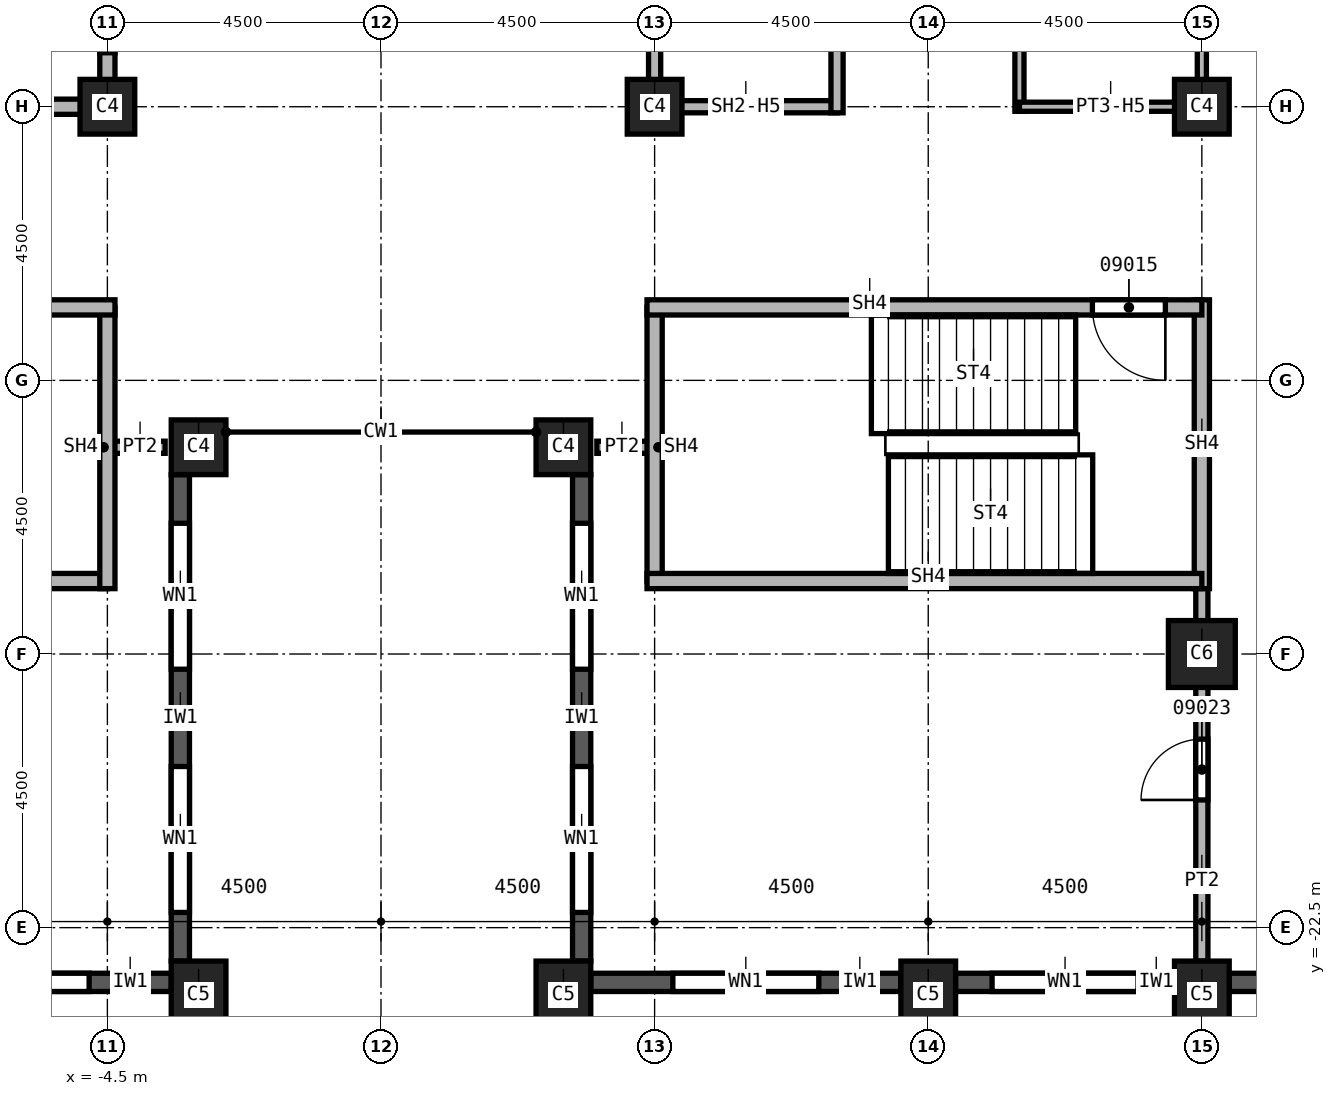
"""IFC4 building model, lengths in metres.
Left out: names, types, materials, properties, quantities, classifications, styles, units other than length and angle.
Written with IfcOpenShell. Run it as: python <this file> out.ifc"""

import sys

from ifc_helpers import new_model, si_unit, direction, frame, frame_2d, origin, origin_2d, place, context, subcontext, project, spatial, rectangle, extrude, element, fill, save


model = new_model("IFC4")
c1 = context("Model", 3, precision=1e-05, world=origin(), true_north=direction((0.0, 1.0)))
c2 = subcontext(c1, "Body", "Model", "MODEL_VIEW")
j1 = project(units=[si_unit("LENGTHUNIT", "METRE"), si_unit("PLANEANGLEUNIT", "RADIAN")], contexts=[c1])
p1 = place(None, origin())
s1 = spatial("IfcSite", under=j1, at=p1, CompositionType="ELEMENT")
p2 = place(p1, origin())
s2 = spatial("IfcBuilding", under=s1, at=p2, CompositionType="ELEMENT")
p3 = place(p2, frame((0.0, 0.0, 162.0)))
s3 = spatial("IfcBuildingStorey", under=s2, at=p3, CompositionType="ELEMENT", Elevation=162.0)
p4 = place(p3, frame((13.5, -18.0, 0.0), z_axis=(0.0, 0.0, 1.0), x_axis=(1.0, 0.0, 0.0)))
e1 = element("IfcColumn", 1, at=p4, inside=s3, PredefinedType="COLUMN", context=c2, shape_type="SweptSolid", body=[
    extrude(rectangle(XDim=1.1, YDim=1.1, at=origin_2d()), origin(), (0.0, 0.0, 1.0), 3.7),
])
for number, where, z_axis, x_axis in (
    (2, (4.5, -9.0, 0.0), (0.0, 0.0, 1.0), (1.0, 0.0, 0.0)),
    (3, (13.5, -9.0, 0.0), (0.0, 0.0, 1.0), (1.0, 0.0, 0.0)),
    (4, (-4.5, -9.0, 0.0), (0.0, 0.0, 1.0), (1.0, 0.0, 0.0)),
):
    element("IfcColumn", number, at=place(p3, frame(where, z_axis=z_axis, x_axis=x_axis)), inside=s3, PredefinedType="COLUMN", context=c2, shape_type="SweptSolid", body=[
        extrude(rectangle(XDim=0.9, YDim=0.9, at=origin_2d()), origin(), (0.0, 0.0, 1.0), 3.7),
    ])
for number, where, z_axis, x_axis in (
    (5, (3.0, -23.6, 0.0), (0.0, 0.0, 1.0), (1.0, 0.0, 0.0)),
    (6, (9.0, -23.6, 0.0), (0.0, 0.0, 1.0), (1.0, 0.0, 0.0)),
    (7, (13.5, -23.6, 0.0), (0.0, 0.0, 1.0), (1.0, 0.0, 0.0)),
    (8, (-3.0, -23.6, 0.0), (0.0, 0.0, 1.0), (1.0, 0.0, 0.0)),
):
    element("IfcColumn", number, at=place(p3, frame(where, z_axis=z_axis, x_axis=x_axis)), inside=s3, PredefinedType="COLUMN", context=c2, shape_type="SweptSolid", body=[
        extrude(rectangle(XDim=0.9, YDim=1.1, at=origin_2d()), origin(), (0.0, 0.0, 1.0), 3.7),
    ])
for number, where, z_axis, x_axis in (
    (9, (3.0, -14.6, 0.0), (0.0, 0.0, 1.0), (1.0, 0.0, 0.0)),
    (10, (-3.0, -14.6, 0.0), (0.0, 0.0, 1.0), (1.0, 0.0, 0.0)),
):
    element("IfcColumn", number, at=place(p3, frame(where, z_axis=z_axis, x_axis=x_axis)), inside=s3, PredefinedType="COLUMN", context=c2, shape_type="SweptSolid", body=[
        extrude(rectangle(XDim=0.9, YDim=0.9, at=origin_2d()), origin(), (0.0, 0.0, 1.0), 3.7),
    ])
p5 = place(p3, frame((-8.55, -23.4, 0.0), z_axis=(0.0, 0.0, 1.0), x_axis=(1.0, 0.0, 0.0)))
e11 = element("IfcWall", 11, at=p5, inside=s3, PredefinedType="SOLIDWALL", context=c2, shape_type="SweptSolid", body=[
    extrude(rectangle(XDim=5.1, YDim=0.3, at=frame_2d((2.55, 0.0))), origin(), (0.0, 0.0, 1.0), 3.1),
])
p6 = place(p5, frame((1.35, 0.0, 0.8)))
e12 = element("IfcOpeningElement", 12, at=p6, cuts=e11, PredefinedType="OPENING", context=c2, shape_type="SweptSolid", body=[
    extrude(rectangle(XDim=2.4, YDim=1.95, at=frame_2d((1.2, 0.975))), frame((0.0, 0.15, 0.0), z_axis=(0.0, -1.0, 0.0), x_axis=(1.0, 0.0, 0.0)), (0.0, 0.0, 1.0), 0.3),
])
p7 = place(p3, frame((-3.3, -23.05, 0.0), z_axis=(0.0, 0.0, 1.0), x_axis=(0.0, 1.0, 0.0)))
e13 = element("IfcWall", 13, at=p7, inside=s3, PredefinedType="SOLIDWALL", context=c2, shape_type="SweptSolid", body=[
    extrude(rectangle(XDim=8.0, YDim=0.3, at=frame_2d((4.0, 0.0))), origin(), (0.0, 0.0, 1.0), 3.1),
])
p8 = place(p7, frame((0.8, 0.0, 0.8)))
e14 = element("IfcOpeningElement", 14, at=p8, cuts=e13, PredefinedType="OPENING", context=c2, shape_type="SweptSolid", body=[
    extrude(rectangle(XDim=2.4, YDim=1.95, at=frame_2d((1.2, 0.975))), frame((0.0, 0.15, 0.0), z_axis=(0.0, -1.0, 0.0), x_axis=(1.0, 0.0, 0.0)), (0.0, 0.0, 1.0), 0.3),
])
p9 = place(p7, frame((4.8, 0.0, 0.8)))
e15 = element("IfcOpeningElement", 15, at=p9, cuts=e13, PredefinedType="OPENING", context=c2, shape_type="SweptSolid", body=[
    extrude(rectangle(XDim=2.4, YDim=1.95, at=frame_2d((1.2, 0.975))), frame((0.0, 0.15, 0.0), z_axis=(0.0, -1.0, 0.0), x_axis=(1.0, 0.0, 0.0)), (0.0, 0.0, 1.0), 0.3),
])
p10 = place(p3, frame((3.3, -15.05, 0.0), z_axis=(0.0, 0.0, 1.0), x_axis=(0.0, -1.0, 0.0)))
e16 = element("IfcWall", 16, at=p10, inside=s3, PredefinedType="SOLIDWALL", context=c2, shape_type="SweptSolid", body=[
    extrude(rectangle(XDim=8.0, YDim=0.3, at=frame_2d((4.0, 0.0))), origin(), (0.0, 0.0, 1.0), 3.1),
])
p11 = place(p10, frame((0.8, 0.0, 0.8)))
e17 = element("IfcOpeningElement", 17, at=p11, cuts=e16, PredefinedType="OPENING", context=c2, shape_type="SweptSolid", body=[
    extrude(rectangle(XDim=2.4, YDim=1.95, at=frame_2d((1.2, 0.975))), frame((0.0, 0.15, 0.0), z_axis=(0.0, -1.0, 0.0), x_axis=(1.0, 0.0, 0.0)), (0.0, 0.0, 1.0), 0.3),
])
p12 = place(p10, frame((4.8, 0.0, 0.8)))
e18 = element("IfcOpeningElement", 18, at=p12, cuts=e16, PredefinedType="OPENING", context=c2, shape_type="SweptSolid", body=[
    extrude(rectangle(XDim=2.4, YDim=1.95, at=frame_2d((1.2, 0.975))), frame((0.0, 0.15, 0.0), z_axis=(0.0, -1.0, 0.0), x_axis=(1.0, 0.0, 0.0)), (0.0, 0.0, 1.0), 0.3),
])
p13 = place(p3, frame((3.45, -23.4, 0.0), z_axis=(0.0, 0.0, 1.0), x_axis=(1.0, 0.0, 0.0)))
e19 = element("IfcWall", 19, at=p13, inside=s3, PredefinedType="SOLIDWALL", context=c2, shape_type="SweptSolid", body=[
    extrude(rectangle(XDim=5.1, YDim=0.3, at=frame_2d((2.55, 0.0))), origin(), (0.0, 0.0, 1.0), 3.1),
])
p14 = place(p13, frame((1.35, 0.0, 0.8)))
e20 = element("IfcOpeningElement", 20, at=p14, cuts=e19, PredefinedType="OPENING", context=c2, shape_type="SweptSolid", body=[
    extrude(rectangle(XDim=2.4, YDim=1.95, at=frame_2d((1.2, 0.975))), frame((0.0, 0.15, 0.0), z_axis=(0.0, -1.0, 0.0), x_axis=(1.0, 0.0, 0.0)), (0.0, 0.0, 1.0), 0.3),
])
p15 = place(p3, frame((9.45, -23.4, 0.0), z_axis=(0.0, 0.0, 1.0), x_axis=(1.0, 0.0, 0.0)))
e21 = element("IfcWall", 21, at=p15, inside=s3, PredefinedType="SOLIDWALL", context=c2, shape_type="SweptSolid", body=[
    extrude(rectangle(XDim=3.6, YDim=0.3, at=frame_2d((1.8, 0.0))), origin(), (0.0, 0.0, 1.0), 3.1),
])
p16 = place(p15, frame((0.6, 0.0, 0.8)))
e22 = element("IfcOpeningElement", 22, at=p16, cuts=e21, PredefinedType="OPENING", context=c2, shape_type="SweptSolid", body=[
    extrude(rectangle(XDim=2.4, YDim=1.95, at=frame_2d((1.2, 0.975))), frame((0.0, 0.15, 0.0), z_axis=(0.0, -1.0, 0.0), x_axis=(1.0, 0.0, 0.0)), (0.0, 0.0, 1.0), 0.3),
])
p17 = place(p3, frame((13.95, -23.4, 0.0), z_axis=(0.0, 0.0, 1.0), x_axis=(1.0, 0.0, 0.0)))
e23 = element("IfcWall", 23, at=p17, inside=s3, PredefinedType="SOLIDWALL", context=c2, shape_type="SweptSolid", body=[
    extrude(rectangle(XDim=3.6, YDim=0.3, at=frame_2d((1.8, 0.0))), origin(), (0.0, 0.0, 1.0), 3.1),
])
p18 = place(p17, frame((0.625, 0.0, 0.8)))
e24 = element("IfcOpeningElement", 24, at=p18, cuts=e23, PredefinedType="OPENING", context=c2, shape_type="SweptSolid", body=[
    extrude(rectangle(XDim=0.6, YDim=1.95, at=frame_2d((0.3, 0.975))), frame((0.0, 0.15, 0.0), z_axis=(0.0, -1.0, 0.0), x_axis=(1.0, 0.0, 0.0)), (0.0, 0.0, 1.0), 0.3),
])
p19 = place(p17, frame((1.825, 0.0, 0.8)))
e25 = element("IfcOpeningElement", 25, at=p19, cuts=e23, PredefinedType="OPENING", context=c2, shape_type="SweptSolid", body=[
    extrude(rectangle(XDim=1.0, YDim=1.95, at=frame_2d((0.5, 0.975))), frame((0.0, 0.15, 0.0), z_axis=(0.0, -1.0, 0.0), x_axis=(1.0, 0.0, 0.0)), (0.0, 0.0, 1.0), 0.3),
])
for number, where, z_axis, x_axis in (
    (26, (-3.55, -14.6, 0.0), (0.0, 0.0, 1.0), (-1.0, 0.0, 0.0)),
    (27, (4.5, -14.6, 0.0), (0.0, 0.0, 1.0), (-1.0, 0.0, 0.0)),
):
    element("IfcWall", number, at=place(p3, frame(where, z_axis=z_axis, x_axis=x_axis)), inside=s3, PredefinedType="PARTITIONING", context=c2, shape_type="SweptSolid", body=[
        extrude(rectangle(XDim=0.95, YDim=0.2, at=frame_2d((0.475, 0.0))), origin(), (0.0, 0.0, 1.0), 3.7),
    ])
p20 = place(p3, frame((13.5, -23.05, 0.0), z_axis=(0.0, 0.0, 1.0), x_axis=(0.0, 1.0, 0.0)))
e28 = element("IfcWall", 28, at=p20, inside=s3, PredefinedType="PARTITIONING", context=c2, shape_type="SweptSolid", body=[
    extrude(rectangle(XDim=6.375, YDim=0.2, at=frame_2d((3.188, 0.0))), origin(), (0.0, 0.0, 1.0), 3.7),
])
p21 = place(p20, frame((2.65, 0.0, 0.0)))
e29 = element("IfcOpeningElement", 29, at=p21, cuts=e28, PredefinedType="OPENING", context=c2, shape_type="SweptSolid", body=[
    extrude(rectangle(XDim=1.0, YDim=2.1, at=frame_2d((0.5, 1.05))), frame((0.0, 0.1, 0.0), z_axis=(0.0, -1.0, 0.0), x_axis=(1.0, 0.0, 0.0)), (0.0, 0.0, 1.0), 0.2),
])
p22 = place(p3, frame((4.5, -9.1, 0.0), z_axis=(0.0, 0.0, 1.0), x_axis=(0.0, 1.0, 0.0)))
e30 = element("IfcWall", 30, at=p22, inside=s3, PredefinedType="SOLIDWALL", context=c2, shape_type="SweptSolid", body=[
    extrude(rectangle(XDim=9.1, YDim=0.2, at=frame_2d((4.55, 0.0))), origin(), (0.0, 0.0, 1.0), 2.938),
])
p23 = place(p22, frame((3.1, 0.0, 0.0)))
e31 = element("IfcOpeningElement", 31, at=p23, cuts=e30, PredefinedType="OPENING", context=c2, shape_type="SweptSolid", body=[
    extrude(rectangle(XDim=1.1, YDim=2.1, at=frame_2d((0.55, 1.05))), frame((0.0, 0.1, 0.0), z_axis=(0.0, -1.0, 0.0), x_axis=(1.0, 0.0, 0.0)), (0.0, 0.0, 1.0), 0.2),
])
p24 = place(p3, frame((7.5, -9.0, 0.0), z_axis=(0.0, 0.0, 1.0), x_axis=(-1.0, 0.0, 0.0)))
e32 = element("IfcWall", 32, at=p24, inside=s3, PredefinedType="SOLIDWALL", context=c2, shape_type="SweptSolid", body=[
    extrude(rectangle(XDim=3.0, YDim=0.2, at=frame_2d((1.5, 0.0))), origin(), (0.0, 0.0, 1.0), 2.938),
])
p25 = place(p3, frame((7.5, -2.875, 0.0), z_axis=(0.0, 0.0, 1.0), x_axis=(0.0, -1.0, 0.0)))
e33 = element("IfcWall", 33, at=p25, inside=s3, PredefinedType="SOLIDWALL", context=c2, shape_type="SweptSolid", body=[
    extrude(rectangle(XDim=6.225, YDim=0.2, at=frame_2d((3.113, 0.0))), origin(), (0.0, 0.0, 1.0), 3.7),
])
p26 = place(p3, frame((-4.5, -9.0, 0.0), z_axis=(0.0, 0.0, 1.0), x_axis=(-1.0, 0.0, 0.0)))
e34 = element("IfcWall", 34, at=p26, inside=s3, PredefinedType="SOLIDWALL", context=c2, shape_type="SweptSolid", body=[
    extrude(rectangle(XDim=3.0, YDim=0.25, at=frame_2d((1.5, 0.0))), origin(), (0.0, 0.0, 1.0), 2.938),
])
p27 = place(p3, frame((-4.5, 0.0, 0.0), z_axis=(0.0, 0.0, 1.0), x_axis=(0.0, -1.0, 0.0)))
e35 = element("IfcWall", 35, at=p27, inside=s3, PredefinedType="SOLIDWALL", context=c2, shape_type="SweptSolid", body=[
    extrude(rectangle(XDim=9.125, YDim=0.25, at=frame_2d((4.562, 0.0))), origin(), (0.0, 0.0, 1.0), 2.938),
])
p28 = place(p27, frame((7.012, 0.0, 0.0)))
e36 = element("IfcOpeningElement", 36, at=p28, cuts=e35, PredefinedType="OPENING", context=c2, shape_type="SweptSolid", body=[
    extrude(rectangle(XDim=1.1, YDim=2.1, at=frame_2d((0.55, 1.05))), frame((0.0, 0.125, 0.0), z_axis=(0.0, -1.0, 0.0), x_axis=(1.0, 0.0, 0.0)), (0.0, 0.0, 1.0), 0.25),
])
p29 = place(p27, frame((3.95, 0.0, 0.0)))
e37 = element("IfcOpeningElement", 37, at=p29, cuts=e35, PredefinedType="OPENING", context=c2, shape_type="SweptSolid", body=[
    extrude(rectangle(XDim=1.1, YDim=2.1, at=frame_2d((0.55, 1.05))), frame((0.0, 0.125, 0.0), z_axis=(0.0, -1.0, 0.0), x_axis=(1.0, 0.0, 0.0)), (0.0, 0.0, 1.0), 0.25),
])
p30 = place(p27, frame((0.95, 0.0, 0.0)))
e38 = element("IfcOpeningElement", 38, at=p30, cuts=e35, PredefinedType="OPENING", context=c2, shape_type="SweptSolid", body=[
    extrude(rectangle(XDim=1.1, YDim=2.1, at=frame_2d((0.55, 1.05))), frame((0.0, 0.125, 0.0), z_axis=(0.0, -1.0, 0.0), x_axis=(1.0, 0.0, 0.0)), (0.0, 0.0, 1.0), 0.25),
])
p31 = place(p3, frame((-4.5, -16.8, 0.0), z_axis=(0.0, 0.0, 1.0), x_axis=(-1.0, 0.0, 0.0)))
e39 = element("IfcWall", 39, at=p31, inside=s3, PredefinedType="SOLIDWALL", context=c2, shape_type="SweptSolid", body=[
    extrude(rectangle(XDim=9.0, YDim=0.25, at=frame_2d((4.5, 0.0))), origin(), (0.0, 0.0, 1.0), 3.7),
])
p32 = place(p3, frame((-4.5, -12.3, 0.0), z_axis=(0.0, 0.0, 1.0), x_axis=(0.0, -1.0, 0.0)))
e40 = element("IfcWall", 40, at=p32, inside=s3, PredefinedType="SOLIDWALL", context=c2, shape_type="SweptSolid", body=[
    extrude(rectangle(XDim=4.625, YDim=0.25, at=frame_2d((2.312, 0.0))), origin(), (0.0, 0.0, 1.0), 3.7),
])
p33 = place(p3, frame((-4.375, -12.3, 0.0), z_axis=(0.0, 0.0, 1.0), x_axis=(-1.0, 0.0, 0.0)))
e41 = element("IfcWall", 41, at=p33, inside=s3, PredefinedType="SOLIDWALL", context=c2, shape_type="SweptSolid", body=[
    extrude(rectangle(XDim=9.125, YDim=0.25, at=frame_2d((4.562, 0.0))), origin(), (0.0, 0.0, 1.0), 3.7),
])
p34 = place(p33, frame((7.2, 0.0, 0.0)))
e42 = element("IfcOpeningElement", 42, at=p34, cuts=e41, PredefinedType="OPENING", context=c2, shape_type="SweptSolid", body=[
    extrude(rectangle(XDim=1.2, YDim=2.1, at=frame_2d((0.6, 1.05))), frame((0.0, 0.125, 0.0), z_axis=(0.0, -1.0, 0.0), x_axis=(1.0, 0.0, 0.0)), (0.0, 0.0, 1.0), 0.25),
])
p35 = place(p3, frame((4.5, -16.8, 0.0), z_axis=(0.0, 0.0, 1.0), x_axis=(0.0, 1.0, 0.0)))
e43 = element("IfcWall", 43, at=p35, inside=s3, PredefinedType="SOLIDWALL", context=c2, shape_type="SweptSolid", body=[
    extrude(rectangle(XDim=4.5, YDim=0.25, at=frame_2d((2.25, 0.0))), origin(), (0.0, 0.0, 1.0), 3.7),
])
p36 = place(p3, frame((13.5, -16.925, 0.0), z_axis=(0.0, 0.0, 1.0), x_axis=(0.0, 1.0, 0.0)))
e44 = element("IfcWall", 44, at=p36, inside=s3, PredefinedType="SOLIDWALL", context=c2, shape_type="SweptSolid", body=[
    extrude(rectangle(XDim=4.75, YDim=0.25, at=frame_2d((2.375, 0.0))), origin(), (0.0, 0.0, 1.0), 3.7),
])
p37 = place(p3, frame((13.5, -16.8, 0.0), z_axis=(0.0, 0.0, 1.0), x_axis=(-1.0, 0.0, 0.0)))
e45 = element("IfcWall", 45, at=p37, inside=s3, PredefinedType="SOLIDWALL", context=c2, shape_type="SweptSolid", body=[
    extrude(rectangle(XDim=9.125, YDim=0.25, at=frame_2d((4.562, 0.0))), origin(), (0.0, 0.0, 1.0), 3.7),
])
p38 = place(p3, frame((13.5, -12.3, 0.0), z_axis=(0.0, 0.0, 1.0), x_axis=(-1.0, 0.0, 0.0)))
e46 = element("IfcWall", 46, at=p38, inside=s3, PredefinedType="SOLIDWALL", context=c2, shape_type="SweptSolid", body=[
    extrude(rectangle(XDim=9.125, YDim=0.25, at=frame_2d((4.562, 0.0))), origin(), (0.0, 0.0, 1.0), 3.7),
])
p39 = place(p38, frame((0.6, 0.0, 0.0)))
e47 = element("IfcOpeningElement", 47, at=p39, cuts=e46, PredefinedType="OPENING", context=c2, shape_type="SweptSolid", body=[
    extrude(rectangle(XDim=1.2, YDim=2.1, at=frame_2d((0.6, 1.05))), frame((0.0, 0.125, 0.0), z_axis=(0.0, -1.0, 0.0), x_axis=(1.0, 0.0, 0.0)), (0.0, 0.0, 1.0), 0.25),
])
p40 = place(p3, frame((10.5, -4.425, 0.0), z_axis=(0.0, 0.0, 1.0), x_axis=(0.0, -1.0, 0.0)))
e48 = element("IfcWall", 48, at=p40, inside=s3, PredefinedType="PARTITIONING", context=c2, shape_type="SweptSolid", body=[
    extrude(rectangle(XDim=4.65, YDim=0.15, at=frame_2d((2.325, 0.0))), origin(), (0.0, 0.0, 1.0), 3.7),
])
p41 = place(p40, frame((0.25, 0.0, 0.0)))
e49 = element("IfcOpeningElement", 49, at=p41, cuts=e48, PredefinedType="OPENING", context=c2, shape_type="SweptSolid", body=[
    extrude(rectangle(XDim=0.9, YDim=2.1, at=frame_2d((0.45, 1.05))), frame((0.0, 0.075, 0.0), z_axis=(0.0, -1.0, 0.0), x_axis=(1.0, 0.0, 0.0)), (0.0, 0.0, 1.0), 0.15),
])
p42 = place(p3, frame((13.5, -9.0, 0.0), z_axis=(0.0, 0.0, 1.0), x_axis=(-1.0, 0.0, 0.0)))
e50 = element("IfcWall", 50, at=p42, inside=s3, PredefinedType="PARTITIONING", context=c2, shape_type="SweptSolid", body=[
    extrude(rectangle(XDim=3.0, YDim=0.15, at=frame_2d((1.5, 0.0))), origin(), (0.0, 0.0, 1.0), 2.938),
])
p43 = place(p3, frame((13.5, -4.5, 0.0), z_axis=(0.0, 0.0, 1.0), x_axis=(0.0, -1.0, 0.0)))
e51 = element("IfcWall", 51, at=p43, inside=s3, PredefinedType="PARTITIONING", context=c2, shape_type="SweptSolid", body=[
    extrude(rectangle(XDim=4.575, YDim=0.15, at=frame_2d((2.288, 0.0))), origin(), (0.0, 0.0, 1.0), 2.938),
])
p44 = place(p6, origin())
e52 = element("IfcWindow", 52, at=p44, inside=s3, PartitioningType="SINGLE_PANEL", PredefinedType="WINDOW", context=c2, shape_type="SweptSolid", body=[
    extrude(rectangle(XDim=2.4, YDim=1.95, at=frame_2d((1.2, 0.975))), frame((0.0, 0.03, 0.0), z_axis=(0.0, -1.0, 0.0), x_axis=(1.0, 0.0, 0.0)), (0.0, 0.0, 1.0), 0.06),
])
fill(e12, e52)
p45 = place(p8, origin())
e53 = element("IfcWindow", 53, at=p45, inside=s3, PartitioningType="SINGLE_PANEL", PredefinedType="WINDOW", context=c2, shape_type="SweptSolid", body=[
    extrude(rectangle(XDim=2.4, YDim=1.95, at=frame_2d((1.2, 0.975))), frame((0.0, 0.03, 0.0), z_axis=(0.0, -1.0, 0.0), x_axis=(1.0, 0.0, 0.0)), (0.0, 0.0, 1.0), 0.06),
])
fill(e14, e53)
p46 = place(p9, origin())
e54 = element("IfcWindow", 54, at=p46, inside=s3, PartitioningType="SINGLE_PANEL", PredefinedType="WINDOW", context=c2, shape_type="SweptSolid", body=[
    extrude(rectangle(XDim=2.4, YDim=1.95, at=frame_2d((1.2, 0.975))), frame((0.0, 0.03, 0.0), z_axis=(0.0, -1.0, 0.0), x_axis=(1.0, 0.0, 0.0)), (0.0, 0.0, 1.0), 0.06),
])
fill(e15, e54)
p47 = place(p11, origin())
e55 = element("IfcWindow", 55, at=p47, inside=s3, PartitioningType="SINGLE_PANEL", PredefinedType="WINDOW", context=c2, shape_type="SweptSolid", body=[
    extrude(rectangle(XDim=2.4, YDim=1.95, at=frame_2d((1.2, 0.975))), frame((0.0, 0.03, 0.0), z_axis=(0.0, -1.0, 0.0), x_axis=(1.0, 0.0, 0.0)), (0.0, 0.0, 1.0), 0.06),
])
fill(e17, e55)
p48 = place(p12, origin())
e56 = element("IfcWindow", 56, at=p48, inside=s3, PartitioningType="SINGLE_PANEL", PredefinedType="WINDOW", context=c2, shape_type="SweptSolid", body=[
    extrude(rectangle(XDim=2.4, YDim=1.95, at=frame_2d((1.2, 0.975))), frame((0.0, 0.03, 0.0), z_axis=(0.0, -1.0, 0.0), x_axis=(1.0, 0.0, 0.0)), (0.0, 0.0, 1.0), 0.06),
])
fill(e18, e56)
p49 = place(p14, origin())
e57 = element("IfcWindow", 57, at=p49, inside=s3, PartitioningType="SINGLE_PANEL", PredefinedType="WINDOW", context=c2, shape_type="SweptSolid", body=[
    extrude(rectangle(XDim=2.4, YDim=1.95, at=frame_2d((1.2, 0.975))), frame((0.0, 0.03, 0.0), z_axis=(0.0, -1.0, 0.0), x_axis=(1.0, 0.0, 0.0)), (0.0, 0.0, 1.0), 0.06),
])
fill(e20, e57)
p50 = place(p16, origin())
e58 = element("IfcWindow", 58, at=p50, inside=s3, PartitioningType="SINGLE_PANEL", PredefinedType="WINDOW", context=c2, shape_type="SweptSolid", body=[
    extrude(rectangle(XDim=2.4, YDim=1.95, at=frame_2d((1.2, 0.975))), frame((0.0, 0.03, 0.0), z_axis=(0.0, -1.0, 0.0), x_axis=(1.0, 0.0, 0.0)), (0.0, 0.0, 1.0), 0.06),
])
fill(e22, e58)
p51 = place(p39, origin())
e59 = element("IfcDoor", 59, at=p51, inside=s3, OperationType="SINGLE_SWING_RIGHT", PredefinedType="DOOR", context=c2, shape_type="SweptSolid", body=[
    extrude(rectangle(XDim=1.2, YDim=2.1, at=frame_2d((0.6, 1.05))), frame((0.0, 0.025, 0.0), z_axis=(0.0, -1.0, 0.0), x_axis=(1.0, 0.0, 0.0)), (0.0, 0.0, 1.0), 0.05),
])
fill(e47, e59)
p52 = place(p21, origin())
e60 = element("IfcDoor", 60, at=p52, inside=s3, OperationType="SINGLE_SWING_RIGHT", PredefinedType="DOOR", context=c2, shape_type="SweptSolid", body=[
    extrude(rectangle(XDim=1.0, YDim=2.1, at=frame_2d((0.5, 1.05))), frame((0.0, 0.025, 0.0), z_axis=(0.0, -1.0, 0.0), x_axis=(1.0, 0.0, 0.0)), (0.0, 0.0, 1.0), 0.05),
])
fill(e29, e60)
p53 = place(p28, origin())
e61 = element("IfcDoor", 61, at=p53, inside=s3, OperationType="SLIDING_TO_LEFT", PredefinedType="DOOR", context=c2, shape_type="SweptSolid", body=[
    extrude(rectangle(XDim=1.1, YDim=2.1, at=frame_2d((0.55, 1.05))), frame((0.0, 0.025, 0.0), z_axis=(0.0, -1.0, 0.0), x_axis=(1.0, 0.0, 0.0)), (0.0, 0.0, 1.0), 0.05),
])
fill(e36, e61)
save(model, sys.argv[1])
